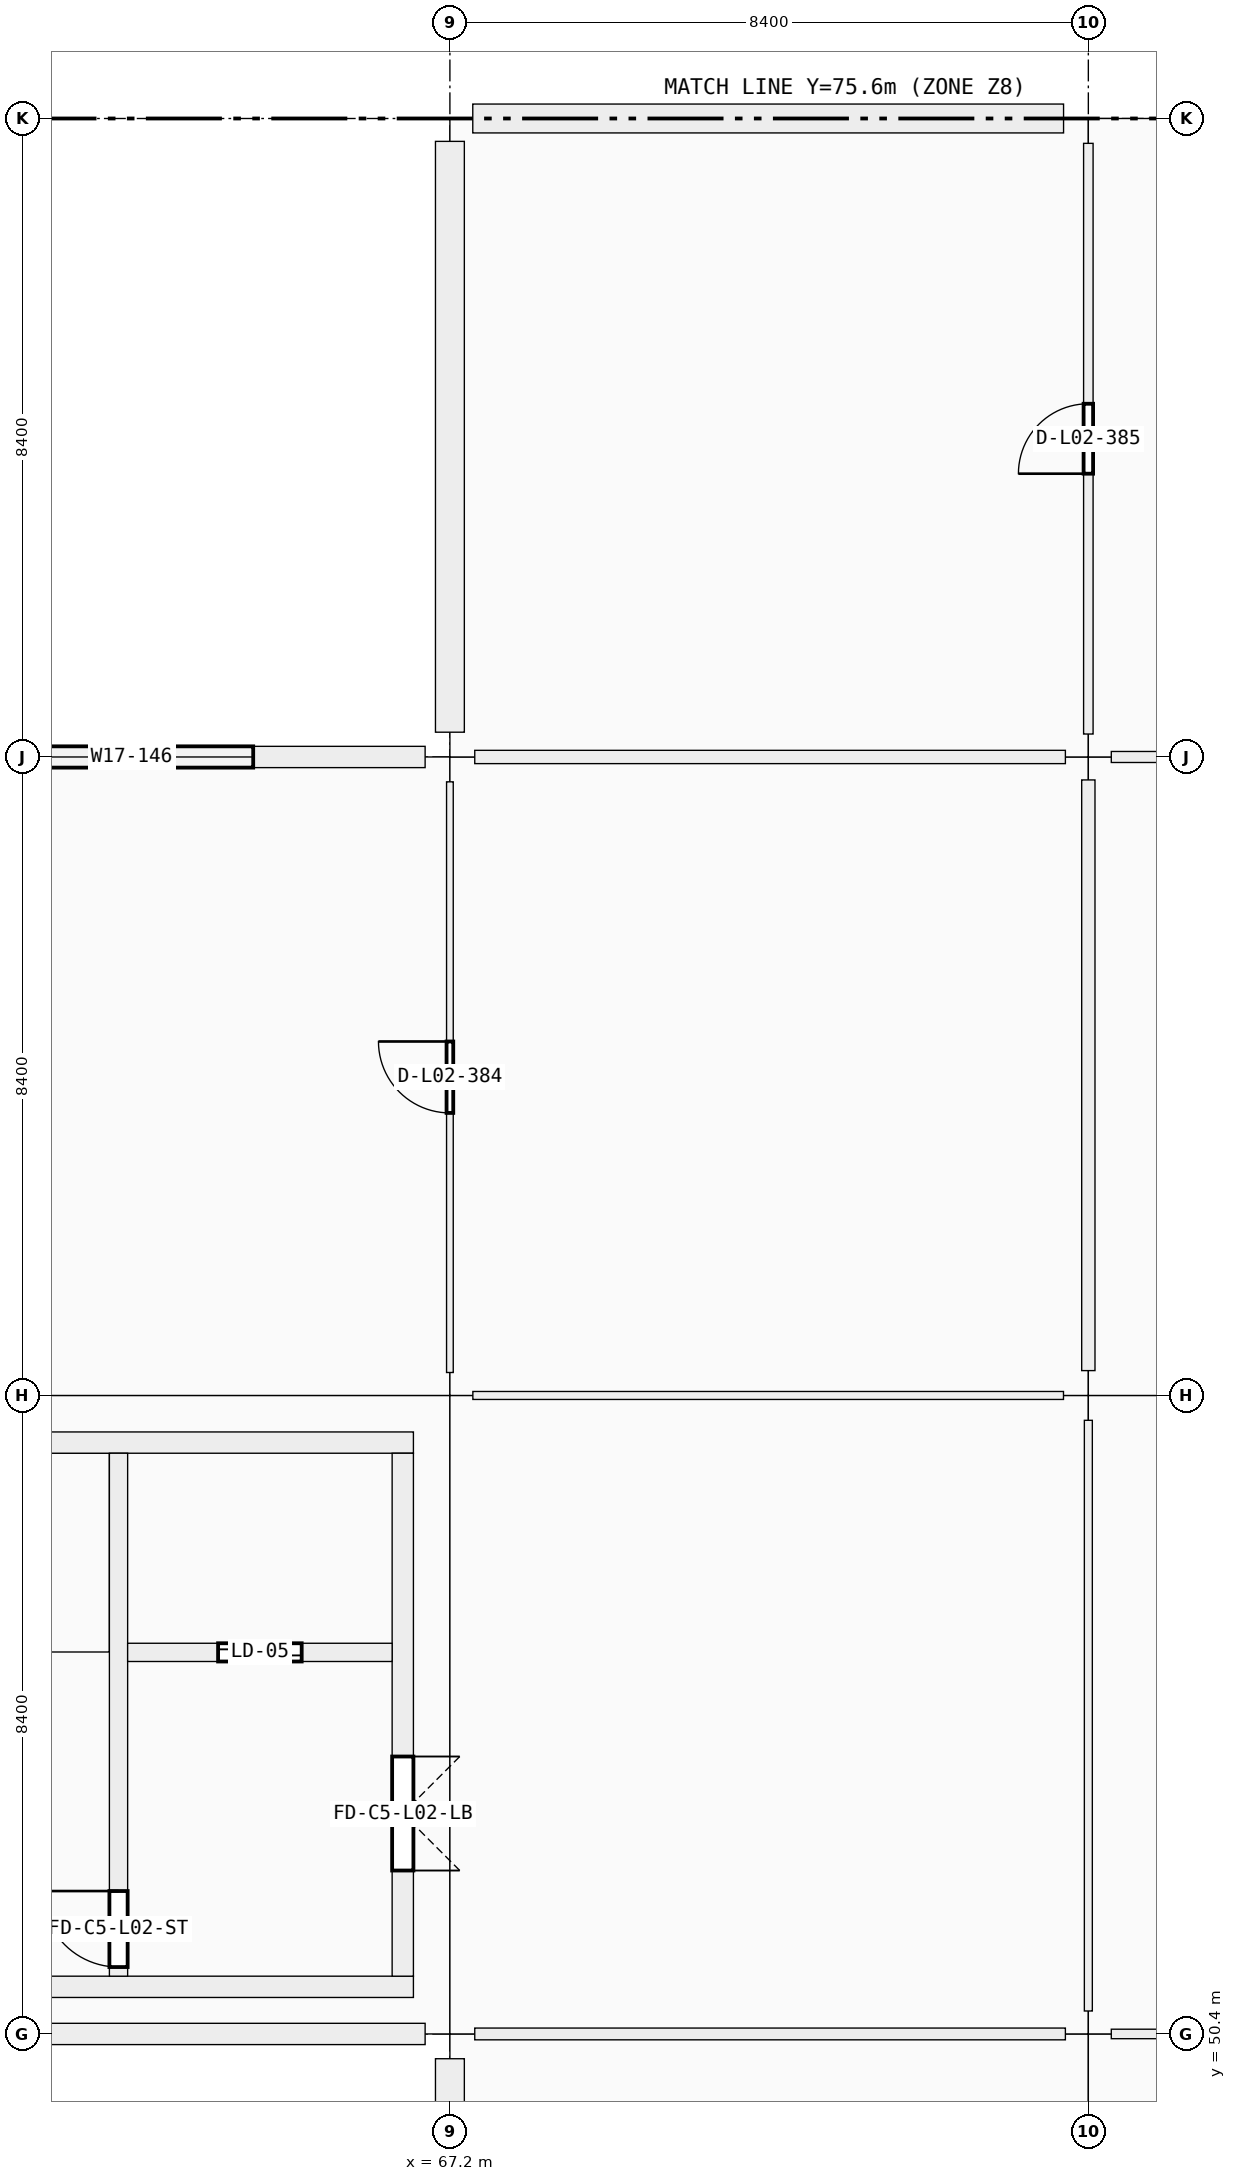
"""IFC4 building model, lengths in metres.
Left out: names, types, materials, properties, quantities, classifications, styles, units other than length and angle.
Written with IfcOpenShell. Run it as: python <this file> out.ifc"""

import sys

from ifc_helpers import new_model, si_unit, direction, frame, frame_2d, origin, origin_2d, place, context, subcontext, project, spatial, rectangle, extrude, element, fill, save


model = new_model("IFC4")
c1 = context("Model", 3, precision=1e-05, world=origin(), true_north=direction((0.0, 1.0)))
c2 = subcontext(c1, "Body", "Model", "MODEL_VIEW")
j1 = project(units=[si_unit("LENGTHUNIT", "METRE"), si_unit("PLANEANGLEUNIT", "RADIAN")], contexts=[c1])
p1 = place(None, origin())
s1 = spatial("IfcSite", under=j1, at=p1, CompositionType="ELEMENT")
p2 = place(p1, origin())
s2 = spatial("IfcBuilding", under=s1, at=p2, CompositionType="ELEMENT")
p3 = place(p2, frame((0.0, 0.0, 10.26)))
s3 = spatial("IfcBuildingStorey", under=s2, at=p3, CompositionType="ELEMENT", Elevation=10.26)
p4 = place(p3, frame((67.2, 50.4, 0.0), z_axis=(0.0, 0.0, 1.0), x_axis=(1.0, 0.0, 0.0)))
e1 = element("IfcColumn", 1, at=p4, inside=s3, PredefinedType="COLUMN", context=c2, shape_type="SweptSolid", body=[
    extrude(rectangle(XDim=0.65, YDim=0.65, at=origin_2d()), origin(), (0.0, 0.0, 1.0), 4.5),
])
p5 = place(p3, frame((67.2, 58.8, 0.0), z_axis=(0.0, 0.0, 1.0), x_axis=(1.0, 0.0, 0.0)))
e2 = element("IfcColumn", 2, at=p5, inside=s3, PredefinedType="COLUMN", context=c2, shape_type="SweptSolid", body=[
    extrude(rectangle(XDim=0.6, YDim=0.6, at=origin_2d()), origin(), (0.0, 0.0, 1.0), 4.5),
])
p6 = place(p3, frame((67.2, 67.2, 0.0), z_axis=(0.0, 0.0, 1.0), x_axis=(1.0, 0.0, 0.0)))
e3 = element("IfcColumn", 3, at=p6, inside=s3, PredefinedType="COLUMN", context=c2, shape_type="SweptSolid", body=[
    extrude(rectangle(XDim=0.65, YDim=0.65, at=origin_2d()), origin(), (0.0, 0.0, 1.0), 4.5),
])
for number, where, z_axis, x_axis in (
    (4, (67.2, 75.6, 0.0), (0.0, 0.0, 1.0), (1.0, 0.0, 0.0)),
    (5, (75.6, 50.4, 0.0), (0.0, 0.0, 1.0), (1.0, 0.0, 0.0)),
):
    element("IfcColumn", number, at=place(p3, frame(where, z_axis=z_axis, x_axis=x_axis)), inside=s3, PredefinedType="COLUMN", context=c2, shape_type="SweptSolid", body=[
        extrude(rectangle(XDim=0.6, YDim=0.6, at=origin_2d()), origin(), (0.0, 0.0, 1.0), 4.5),
    ])
p7 = place(p3, frame((75.6, 58.8, -0.3), z_axis=(0.0, 0.0, 1.0), x_axis=(1.0, 0.0, 0.0)))
e6 = element("IfcColumn", 6, at=p7, inside=s3, PredefinedType="COLUMN", context=c2, shape_type="SweptSolid", body=[
    extrude(rectangle(XDim=0.65, YDim=0.65, at=origin_2d()), origin(), (0.0, 0.0, 1.0), 4.8),
])
p8 = place(p3, frame((75.6, 67.2, 0.0), z_axis=(0.0, 0.0, 1.0), x_axis=(1.0, 0.0, 0.0)))
e7 = element("IfcColumn", 7, at=p8, inside=s3, PredefinedType="COLUMN", context=c2, shape_type="SweptSolid", body=[
    extrude(rectangle(XDim=0.6, YDim=0.6, at=origin_2d()), origin(), (0.0, 0.0, 1.0), 4.5),
])
p9 = place(p3, frame((75.6, 75.6, 0.0), z_axis=(0.0, 0.0, 1.0), x_axis=(1.0, 0.0, 0.0)))
e8 = element("IfcColumn", 8, at=p9, inside=s3, PredefinedType="COLUMN", context=c2, shape_type="SweptSolid", body=[
    extrude(rectangle(XDim=0.65, YDim=0.65, at=origin_2d()), origin(), (0.0, 0.0, 1.0), 4.5),
])
p10 = place(p3, frame((66.874, 50.4, 0.0), z_axis=(0.0, 0.0, 1.0), x_axis=(-1.0, 0.0, 0.0)))
e9 = element("IfcWall", 9, at=p10, inside=s3, PredefinedType="SOLIDWALL", context=c2, shape_type="SweptSolid", body=[
    extrude(rectangle(XDim=7.773, YDim=0.28, at=frame_2d((3.886, 0.0))), origin(), (0.0, 0.0, 1.0), 3.54),
])
p11 = place(p3, frame((59.151, 67.2, 0.0), z_axis=(0.0, 0.0, 1.0), x_axis=(1.0, 0.0, 0.0)))
e10 = element("IfcWall", 10, at=p11, inside=s3, PredefinedType="SOLIDWALL", context=c2, shape_type="SweptSolid", body=[
    extrude(rectangle(XDim=7.723, YDim=0.28, at=frame_2d((3.862, 0.0))), origin(), (0.0, 0.0, 1.0), 3.54),
])
p12 = place(p11, frame((2.261, 0.0, 0.9)))
e11 = element("IfcOpeningElement", 11, at=p12, cuts=e10, PredefinedType="OPENING", context=c2, shape_type="SweptSolid", body=[
    extrude(rectangle(XDim=3.2, YDim=1.75, at=frame_2d((1.6, 0.875))), frame((0.0, 0.14, 0.0), z_axis=(0.0, -1.0, 0.0), x_axis=(1.0, 0.0, 0.0)), (0.0, 0.0, 1.0), 0.28),
])
p13 = place(p3, frame((67.2, 42.301, 0.0), z_axis=(0.0, 0.0, 1.0), x_axis=(0.0, 1.0, 0.0)))
e12 = element("IfcWall", 12, at=p13, inside=s3, PredefinedType="SOLIDWALL", context=c2, shape_type="SweptSolid", body=[
    extrude(rectangle(XDim=7.773, YDim=0.38, at=frame_2d((3.886, 0.0))), origin(), (0.0, 0.0, 1.0), 3.54),
])
p14 = place(p3, frame((67.2, 67.526, 0.0), z_axis=(0.0, 0.0, 1.0), x_axis=(0.0, 1.0, 0.0)))
e13 = element("IfcWall", 13, at=p14, inside=s3, PredefinedType="SOLIDWALL", context=c2, shape_type="SweptSolid", body=[
    extrude(rectangle(XDim=7.773, YDim=0.38, at=frame_2d((3.887, 0.0))), origin(), (0.0, 0.0, 1.0), 3.54),
])
p15 = place(p3, frame((67.501, 75.6, 0.0), z_axis=(0.0, 0.0, 1.0), x_axis=(1.0, 0.0, 0.0)))
e14 = element("IfcWall", 14, at=p15, inside=s3, PredefinedType="SOLIDWALL", context=c2, shape_type="SweptSolid", body=[
    extrude(rectangle(XDim=7.773, YDim=0.38, at=frame_2d((3.886, 0.0))), origin(), (0.0, 0.0, 1.0), 3.54),
])
for number, where, z_axis, x_axis in (
    (15, (66.72, 51.02, 0.0), (0.0, 0.0, 1.0), (-1.0, 0.0, 0.0)),
    (16, (59.28, 58.18, 0.0), (0.0, 0.0, 1.0), (1.0, 0.0, 0.0)),
):
    element("IfcWall", number, at=place(p3, frame(where, z_axis=z_axis, x_axis=x_axis)), inside=s3, PredefinedType="SHEAR", context=c2, shape_type="SweptSolid", body=[
        extrude(rectangle(XDim=7.44, YDim=0.28, at=frame_2d((3.72, 0.0))), origin(), (0.0, 0.0, 1.0), 4.5),
    ])
p16 = place(p3, frame((66.58, 58.04, 0.0), z_axis=(0.0, 0.0, 1.0), x_axis=(0.0, -1.0, 0.0)))
e17 = element("IfcWall", 17, at=p16, inside=s3, PredefinedType="SHEAR", context=c2, shape_type="SweptSolid", body=[
    extrude(rectangle(XDim=6.88, YDim=0.28, at=frame_2d((3.44, 0.0))), origin(), (0.0, 0.0, 1.0), 4.5),
])
p17 = place(p16, frame((3.99, 0.0, 0.0)))
e18 = element("IfcOpeningElement", 18, at=p17, cuts=e17, PredefinedType="OPENING", context=c2, shape_type="SweptSolid", body=[
    extrude(rectangle(XDim=1.5, YDim=2.15, at=frame_2d((0.75, 1.075))), frame((0.0, 0.14, 0.0), z_axis=(0.0, -1.0, 0.0), x_axis=(1.0, 0.0, 0.0)), (0.0, 0.0, 1.0), 0.28),
])
p18 = place(p3, frame((62.84, 51.16, 0.0), z_axis=(0.0, 0.0, 1.0), x_axis=(0.0, 1.0, 0.0)))
e19 = element("IfcWall", 19, at=p18, inside=s3, PredefinedType="SHEAR", context=c2, shape_type="SweptSolid", body=[
    extrude(rectangle(XDim=6.88, YDim=0.24, at=frame_2d((3.44, 0.0))), origin(), (0.0, 0.0, 1.0), 4.5),
])
p19 = place(p18, frame((0.12, 0.0, 0.0)))
e20 = element("IfcOpeningElement", 20, at=p19, cuts=e19, PredefinedType="OPENING", context=c2, shape_type="SweptSolid", body=[
    extrude(rectangle(XDim=1.0, YDim=2.15, at=frame_2d((0.5, 1.075))), frame((0.0, 0.12, 0.0), z_axis=(0.0, -1.0, 0.0), x_axis=(1.0, 0.0, 0.0)), (0.0, 0.0, 1.0), 0.24),
])
p20 = place(p3, frame((62.96, 55.42, 0.0), z_axis=(0.0, 0.0, 1.0), x_axis=(1.0, 0.0, 0.0)))
e21 = element("IfcWall", 21, at=p20, inside=s3, PredefinedType="SHEAR", context=c2, shape_type="SweptSolid", body=[
    extrude(rectangle(XDim=3.48, YDim=0.24, at=frame_2d((1.74, 0.0))), origin(), (0.0, 0.0, 1.0), 4.5),
])
p21 = place(p20, frame((1.19, 0.0, 0.0)))
e22 = element("IfcOpeningElement", 22, at=p21, cuts=e21, PredefinedType="OPENING", context=c2, shape_type="SweptSolid", body=[
    extrude(rectangle(XDim=1.1, YDim=2.15, at=frame_2d((0.55, 1.075))), frame((0.0, 0.12, 0.0), z_axis=(0.0, -1.0, 0.0), x_axis=(1.0, 0.0, 0.0)), (0.0, 0.0, 1.0), 0.24),
])
p22 = place(p3, frame((67.527, 50.4, 0.0), z_axis=(0.0, 0.0, 1.0), x_axis=(1.0, 0.0, 0.0)))
e23 = element("IfcWall", 23, at=p22, inside=s3, PredefinedType="PARTITIONING", context=c2, shape_type="SweptSolid", body=[
    extrude(rectangle(XDim=7.771, YDim=0.155, at=frame_2d((3.885, 0.0))), origin(), (0.0, 0.0, 1.0), 3.37),
])
p23 = place(p22, frame((2.986, 0.0, 0.0)))
e24 = element("IfcOpeningElement", 24, at=p23, cuts=e23, PredefinedType="OPENING", context=c2, shape_type="SweptSolid", body=[
    extrude(rectangle(XDim=1.8, YDim=2.4, at=frame_2d((0.9, 1.2))), frame((0.0, 0.078, 0.0), z_axis=(0.0, -1.0, 0.0), x_axis=(1.0, 0.0, 0.0)), (0.0, 0.0, 1.0), 0.155),
])
p24 = place(p3, frame((67.502, 58.8, 0.0), z_axis=(0.0, 0.0, 1.0), x_axis=(1.0, 0.0, 0.0)))
e25 = element("IfcWall", 25, at=p24, inside=s3, PredefinedType="PARTITIONING", context=c2, shape_type="SweptSolid", body=[
    extrude(rectangle(XDim=7.771, YDim=0.105, at=frame_2d((3.885, 0.0))), origin(), (0.0, 0.0, 1.0), 3.37),
])
p25 = place(p24, frame((3.035, 0.0, 0.0)))
e26 = element("IfcOpeningElement", 26, at=p25, cuts=e25, PredefinedType="OPENING", context=c2, shape_type="SweptSolid", body=[
    extrude(rectangle(XDim=1.7, YDim=2.35, at=frame_2d((0.85, 1.175))), frame((0.0, 0.052, 0.0), z_axis=(0.0, -1.0, 0.0), x_axis=(1.0, 0.0, 0.0)), (0.0, 0.0, 1.0), 0.105),
])
p26 = place(p3, frame((67.527, 67.2, 0.0), z_axis=(0.0, 0.0, 1.0), x_axis=(1.0, 0.0, 0.0)))
e27 = element("IfcWall", 27, at=p26, inside=s3, PredefinedType="PARTITIONING", context=c2, shape_type="SweptSolid", body=[
    extrude(rectangle(XDim=7.771, YDim=0.175, at=frame_2d((3.885, 0.0))), origin(), (0.0, 0.0, 1.0), 3.37),
])
p27 = place(p26, frame((3.085, 0.0, 0.0)))
e28 = element("IfcOpeningElement", 28, at=p27, cuts=e27, PredefinedType="OPENING", context=c2, shape_type="SweptSolid", body=[
    extrude(rectangle(XDim=1.6, YDim=2.3, at=frame_2d((0.8, 1.15))), frame((0.0, 0.087, 0.0), z_axis=(0.0, -1.0, 0.0), x_axis=(1.0, 0.0, 0.0)), (0.0, 0.0, 1.0), 0.175),
])
p28 = place(p3, frame((75.902, 50.4, 0.0), z_axis=(0.0, 0.0, 1.0), x_axis=(1.0, 0.0, 0.0)))
e29 = element("IfcWall", 29, at=p28, inside=s3, PredefinedType="PARTITIONING", context=c2, shape_type="SweptSolid", body=[
    extrude(rectangle(XDim=7.771, YDim=0.125, at=frame_2d((3.885, 0.0))), origin(), (0.0, 0.0, 1.0), 3.37),
])
p29 = place(p28, frame((3.135, 0.0, 0.0)))
e30 = element("IfcOpeningElement", 30, at=p29, cuts=e29, PredefinedType="OPENING", context=c2, shape_type="SweptSolid", body=[
    extrude(rectangle(XDim=1.5, YDim=2.25, at=frame_2d((0.75, 1.125))), frame((0.0, 0.062, 0.0), z_axis=(0.0, -1.0, 0.0), x_axis=(1.0, 0.0, 0.0)), (0.0, 0.0, 1.0), 0.125),
])
p30 = place(p3, frame((75.902, 67.2, 0.0), z_axis=(0.0, 0.0, 1.0), x_axis=(1.0, 0.0, 0.0)))
e31 = element("IfcWall", 31, at=p30, inside=s3, PredefinedType="PARTITIONING", context=c2, shape_type="SweptSolid", body=[
    extrude(rectangle(XDim=7.771, YDim=0.145, at=frame_2d((3.885, 0.0))), origin(), (0.0, 0.0, 1.0), 3.37),
])
p31 = place(p30, frame((3.16, 0.0, 0.0)))
e32 = element("IfcOpeningElement", 32, at=p31, cuts=e31, PredefinedType="OPENING", context=c2, shape_type="SweptSolid", body=[
    extrude(rectangle(XDim=1.45, YDim=2.2, at=frame_2d((0.725, 1.1))), frame((0.0, 0.073, 0.0), z_axis=(0.0, -1.0, 0.0), x_axis=(1.0, 0.0, 0.0)), (0.0, 0.0, 1.0), 0.145),
])
p32 = place(p3, frame((67.2, 59.102, 0.0), z_axis=(0.0, 0.0, 1.0), x_axis=(0.0, 1.0, 0.0)))
e33 = element("IfcWall", 33, at=p32, inside=s3, PredefinedType="PARTITIONING", context=c2, shape_type="SweptSolid", body=[
    extrude(rectangle(XDim=7.771, YDim=0.088, at=frame_2d((3.885, 0.0))), origin(), (0.0, 0.0, 1.0), 3.37),
])
p33 = place(p32, frame((3.415, 0.0, 0.0)))
e34 = element("IfcOpeningElement", 34, at=p33, cuts=e33, PredefinedType="OPENING", context=c2, shape_type="SweptSolid", body=[
    extrude(rectangle(XDim=0.94, YDim=2.15, at=frame_2d((0.47, 1.075))), frame((0.0, 0.044, 0.0), z_axis=(0.0, -1.0, 0.0), x_axis=(1.0, 0.0, 0.0)), (0.0, 0.0, 1.0), 0.088),
])
p34 = place(p3, frame((75.6, 50.702, 0.0), z_axis=(0.0, 0.0, 1.0), x_axis=(0.0, 1.0, 0.0)))
e35 = element("IfcWall", 35, at=p34, inside=s3, PredefinedType="PARTITIONING", context=c2, shape_type="SweptSolid", body=[
    extrude(rectangle(XDim=7.771, YDim=0.105, at=frame_2d((3.885, 0.0))), origin(), (0.0, 0.0, 1.0), 3.37),
])
p35 = place(p34, frame((3.21, 0.0, 0.0)))
e36 = element("IfcOpeningElement", 36, at=p35, cuts=e35, PredefinedType="OPENING", context=c2, shape_type="SweptSolid", body=[
    extrude(rectangle(XDim=1.35, YDim=2.2, at=frame_2d((0.675, 1.1))), frame((0.0, 0.052, 0.0), z_axis=(0.0, -1.0, 0.0), x_axis=(1.0, 0.0, 0.0)), (0.0, 0.0, 1.0), 0.105),
])
p36 = place(p3, frame((75.6, 59.127, 0.0), z_axis=(0.0, 0.0, 1.0), x_axis=(0.0, 1.0, 0.0)))
e37 = element("IfcWall", 37, at=p36, inside=s3, PredefinedType="PARTITIONING", context=c2, shape_type="SweptSolid", body=[
    extrude(rectangle(XDim=7.771, YDim=0.175, at=frame_2d((3.885, 0.0))), origin(), (0.0, 0.0, 1.0), 3.37),
])
p37 = place(p36, frame((2.986, 0.0, 0.0)))
e38 = element("IfcOpeningElement", 38, at=p37, cuts=e37, PredefinedType="OPENING", context=c2, shape_type="SweptSolid", body=[
    extrude(rectangle(XDim=1.8, YDim=2.4, at=frame_2d((0.9, 1.2))), frame((0.0, 0.087, 0.0), z_axis=(0.0, -1.0, 0.0), x_axis=(1.0, 0.0, 0.0)), (0.0, 0.0, 1.0), 0.175),
])
p38 = place(p3, frame((75.6, 67.502, 0.0), z_axis=(0.0, 0.0, 1.0), x_axis=(0.0, 1.0, 0.0)))
e39 = element("IfcWall", 39, at=p38, inside=s3, PredefinedType="PARTITIONING", context=c2, shape_type="SweptSolid", body=[
    extrude(rectangle(XDim=7.771, YDim=0.125, at=frame_2d((3.885, 0.0))), origin(), (0.0, 0.0, 1.0), 3.37),
])
p39 = place(p38, frame((3.425, 0.0, 0.0)))
e40 = element("IfcOpeningElement", 40, at=p39, cuts=e39, PredefinedType="OPENING", context=c2, shape_type="SweptSolid", body=[
    extrude(rectangle(XDim=0.92, YDim=2.15, at=frame_2d((0.46, 1.075))), frame((0.0, 0.062, 0.0), z_axis=(0.0, -1.0, 0.0), x_axis=(1.0, 0.0, 0.0)), (0.0, 0.0, 1.0), 0.125),
])
p40 = place(p12, origin())
e41 = element("IfcWindow", 41, at=p40, inside=s3, PartitioningType="SINGLE_PANEL", PredefinedType="WINDOW", context=c2, shape_type="SweptSolid", body=[
    extrude(rectangle(XDim=3.2, YDim=1.75, at=frame_2d((1.6, 0.875))), frame((0.0, 0.03, 0.0), z_axis=(0.0, -1.0, 0.0), x_axis=(1.0, 0.0, 0.0)), (0.0, 0.0, 1.0), 0.06),
])
fill(e11, e41)
p41 = place(p19, origin())
e42 = element("IfcDoor", 42, at=p41, inside=s3, OperationType="SINGLE_SWING_RIGHT", PredefinedType="DOOR", context=c2, shape_type="SweptSolid", body=[
    extrude(rectangle(XDim=1.0, YDim=2.15, at=frame_2d((0.5, 1.075))), frame((0.0, 0.025, 0.0), z_axis=(0.0, -1.0, 0.0), x_axis=(1.0, 0.0, 0.0)), (0.0, 0.0, 1.0), 0.05),
])
fill(e20, e42)
p42 = place(p17, origin())
e43 = element("IfcDoor", 43, at=p42, inside=s3, OperationType="DOUBLE_DOOR_SINGLE_SWING", PredefinedType="DOOR", context=c2, shape_type="SweptSolid", body=[
    extrude(rectangle(XDim=1.5, YDim=2.15, at=frame_2d((0.75, 1.075))), frame((0.0, 0.025, 0.0), z_axis=(0.0, -1.0, 0.0), x_axis=(1.0, 0.0, 0.0)), (0.0, 0.0, 1.0), 0.05),
])
fill(e18, e43)
p43 = place(p21, origin())
e44 = element("IfcDoor", 44, at=p43, inside=s3, OperationType="DOUBLE_DOOR_SLIDING", PredefinedType="DOOR", context=c2, shape_type="SweptSolid", body=[
    extrude(rectangle(XDim=1.1, YDim=2.15, at=frame_2d((0.55, 1.075))), frame((0.0, 0.025, 0.0), z_axis=(0.0, -1.0, 0.0), x_axis=(1.0, 0.0, 0.0)), (0.0, 0.0, 1.0), 0.05),
])
fill(e22, e44)
p44 = place(p23, origin())
e45 = element("IfcDoor", 45, at=p44, inside=s3, OperationType="DOUBLE_DOOR_SINGLE_SWING", PredefinedType="DOOR", context=c2, shape_type="SweptSolid", body=[
    extrude(rectangle(XDim=1.8, YDim=2.4, at=frame_2d((0.9, 1.2))), frame((0.0, 0.025, 0.0), z_axis=(0.0, -1.0, 0.0), x_axis=(1.0, 0.0, 0.0)), (0.0, 0.0, 1.0), 0.05),
])
fill(e24, e45)
p45 = place(p25, origin())
e46 = element("IfcDoor", 46, at=p45, inside=s3, OperationType="DOUBLE_DOOR_SINGLE_SWING", PredefinedType="DOOR", context=c2, shape_type="SweptSolid", body=[
    extrude(rectangle(XDim=1.7, YDim=2.35, at=frame_2d((0.85, 1.175))), frame((0.0, 0.025, 0.0), z_axis=(0.0, -1.0, 0.0), x_axis=(1.0, 0.0, 0.0)), (0.0, 0.0, 1.0), 0.05),
])
fill(e26, e46)
p46 = place(p27, origin())
e47 = element("IfcDoor", 47, at=p46, inside=s3, OperationType="DOUBLE_DOOR_SINGLE_SWING", PredefinedType="DOOR", context=c2, shape_type="SweptSolid", body=[
    extrude(rectangle(XDim=1.6, YDim=2.3, at=frame_2d((0.8, 1.15))), frame((0.0, 0.025, 0.0), z_axis=(0.0, -1.0, 0.0), x_axis=(1.0, 0.0, 0.0)), (0.0, 0.0, 1.0), 0.05),
])
fill(e28, e47)
p47 = place(p35, origin())
e48 = element("IfcDoor", 48, at=p47, inside=s3, OperationType="DOUBLE_DOOR_SINGLE_SWING", PredefinedType="DOOR", context=c2, shape_type="SweptSolid", body=[
    extrude(rectangle(XDim=1.35, YDim=2.2, at=frame_2d((0.675, 1.1))), frame((0.0, 0.025, 0.0), z_axis=(0.0, -1.0, 0.0), x_axis=(1.0, 0.0, 0.0)), (0.0, 0.0, 1.0), 0.05),
])
fill(e36, e48)
p48 = place(p37, origin())
e49 = element("IfcDoor", 49, at=p48, inside=s3, OperationType="DOUBLE_DOOR_SINGLE_SWING", PredefinedType="DOOR", context=c2, shape_type="SweptSolid", body=[
    extrude(rectangle(XDim=1.8, YDim=2.4, at=frame_2d((0.9, 1.2))), frame((0.0, 0.025, 0.0), z_axis=(0.0, -1.0, 0.0), x_axis=(1.0, 0.0, 0.0)), (0.0, 0.0, 1.0), 0.05),
])
fill(e38, e49)
p49 = place(p33, origin())
e50 = element("IfcDoor", 50, at=p49, inside=s3, OperationType="SINGLE_SWING_RIGHT", PredefinedType="DOOR", context=c2, shape_type="SweptSolid", body=[
    extrude(rectangle(XDim=0.94, YDim=2.15, at=frame_2d((0.47, 1.075))), frame((0.0, 0.025, 0.0), z_axis=(0.0, -1.0, 0.0), x_axis=(1.0, 0.0, 0.0)), (0.0, 0.0, 1.0), 0.05),
])
fill(e34, e50)
p50 = place(p39, origin())
e51 = element("IfcDoor", 51, at=p50, inside=s3, OperationType="SINGLE_SWING_LEFT", PredefinedType="DOOR", context=c2, shape_type="SweptSolid", body=[
    extrude(rectangle(XDim=0.92, YDim=2.15, at=frame_2d((0.46, 1.075))), frame((0.0, 0.025, 0.0), z_axis=(0.0, -1.0, 0.0), x_axis=(1.0, 0.0, 0.0)), (0.0, 0.0, 1.0), 0.05),
])
fill(e40, e51)
save(model, sys.argv[1])
